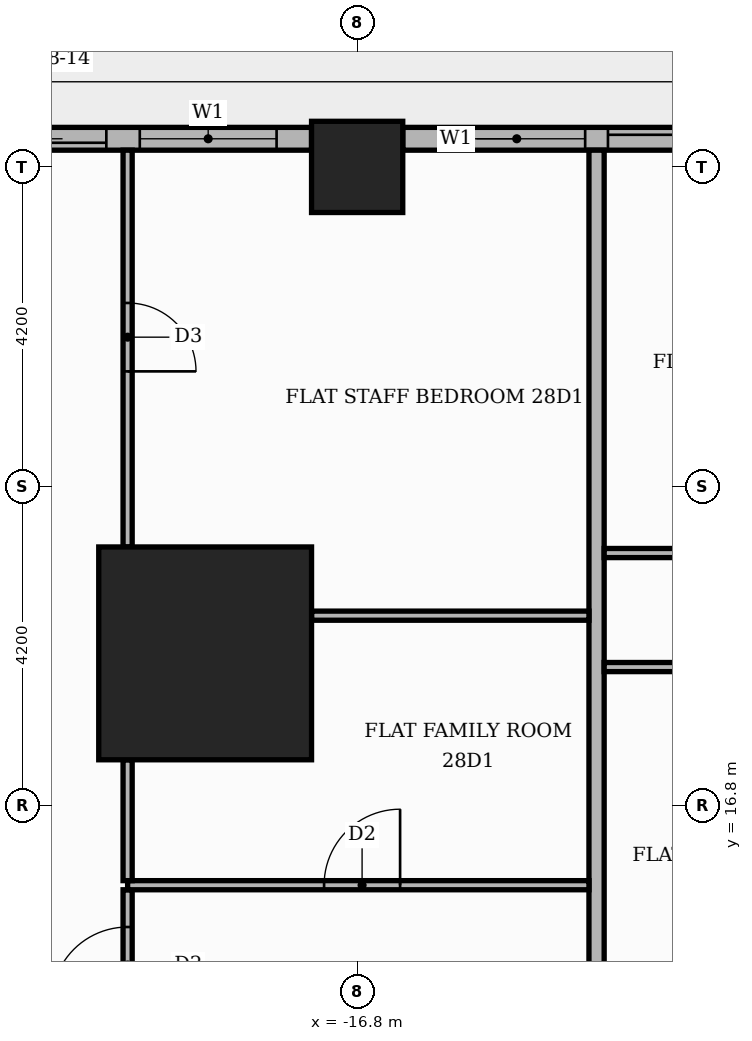
"""IFC4 building model, lengths in metres.
Left out: names, types, materials, properties, quantities, classifications, styles, units other than length and angle.
Written with IfcOpenShell. Run it as: python <this file> out.ifc"""

import sys

from ifc_helpers import new_model, si_unit, direction, frame, frame_2d, origin, origin_2d, place, context, subcontext, project, spatial, rectangle, extrude, element, fill, save


model = new_model("IFC4")
c1 = context("Model", 3, precision=1e-05, world=origin(), true_north=direction((0.0, 1.0)))
c2 = subcontext(c1, "Body", "Model", "MODEL_VIEW")
j1 = project(units=[si_unit("LENGTHUNIT", "METRE"), si_unit("PLANEANGLEUNIT", "RADIAN")], contexts=[c1])
p1 = place(None, origin())
s1 = spatial("IfcSite", under=j1, at=p1, CompositionType="ELEMENT")
p2 = place(p1, origin())
s2 = spatial("IfcBuilding", under=s1, at=p2, CompositionType="ELEMENT")
p3 = place(p2, frame((0.0, 0.0, 118.2)))
s3 = spatial("IfcBuildingStorey", under=s2, at=p3, CompositionType="ELEMENT", Elevation=118.2)
p4 = place(p3, frame((-18.8, 18.8, 0.0), z_axis=(0.0, 0.0, 1.0), x_axis=(1.0, 0.0, 0.0)))
e1 = element("IfcColumn", 1, at=p4, inside=s3, PredefinedType="COLUMN", context=c2, shape_type="SweptSolid", body=[
    extrude(rectangle(XDim=2.8, YDim=2.8, at=origin_2d()), origin(), (0.0, 0.0, 1.0), 3.9),
])
p5 = place(p3, frame((-16.8, 25.2, 0.0), z_axis=(0.0, 0.0, 1.0), x_axis=(1.0, 0.0, 0.0)))
e2 = element("IfcColumn", 2, at=p5, inside=s3, PredefinedType="COLUMN", context=c2, shape_type="SweptSolid", body=[
    extrude(rectangle(XDim=1.2, YDim=1.2, at=origin_2d()), origin(), (0.0, 0.0, 1.0), 3.9),
])
p6 = place(p3, frame((-9.0, 25.57, 0.0), z_axis=(0.0, 0.0, 1.0), x_axis=(-1.0, 0.0, 0.0)))
e3 = element("IfcWall", 3, at=p6, inside=s3, PredefinedType="STANDARD", context=c2, shape_type="SweptSolid", body=[
    extrude(rectangle(XDim=7.2, YDim=0.3, at=frame_2d((3.6, 0.0))), origin(), (0.0, 0.0, 1.0), 3.48),
])
p7 = place(p6, frame((0.6, 0.0, 0.0)))
e4 = element("IfcOpeningElement", 4, at=p7, cuts=e3, PredefinedType="OPENING", context=c2, shape_type="SweptSolid", body=[
    extrude(rectangle(XDim=3.9, YDim=2.4, at=frame_2d((1.95, 1.2))), frame((0.0, 0.16, 0.0), z_axis=(0.0, -1.0, 0.0), x_axis=(1.0, 0.0, 0.0)), (0.0, 0.0, 1.0), 0.32),
])
p8 = place(p6, frame((4.8, 0.0, 0.9)))
e5 = element("IfcOpeningElement", 5, at=p8, cuts=e3, PredefinedType="OPENING", context=c2, shape_type="SweptSolid", body=[
    extrude(rectangle(XDim=1.8, YDim=2.1, at=frame_2d((0.9, 1.05))), frame((0.0, 0.16, 0.0), z_axis=(0.0, -1.0, 0.0), x_axis=(1.0, 0.0, 0.0)), (0.0, 0.0, 1.0), 0.32),
])
p9 = place(p3, frame((-17.4, 25.57, 0.0), z_axis=(0.0, 0.0, 1.0), x_axis=(-1.0, 0.0, 0.0)))
e6 = element("IfcWall", 6, at=p9, inside=s3, PredefinedType="STANDARD", context=c2, shape_type="SweptSolid", body=[
    extrude(rectangle(XDim=4.82, YDim=0.3, at=frame_2d((2.41, 0.0))), origin(), (0.0, 0.0, 1.0), 3.48),
])
p10 = place(p9, frame((2.7, 0.0, 0.0)))
e7 = element("IfcOpeningElement", 7, at=p10, cuts=e6, PredefinedType="OPENING", context=c2, shape_type="SweptSolid", body=[
    extrude(rectangle(XDim=1.8, YDim=2.4, at=frame_2d((0.9, 1.2))), frame((0.0, 0.16, 0.0), z_axis=(0.0, -1.0, 0.0), x_axis=(1.0, 0.0, 0.0)), (0.0, 0.0, 1.0), 0.32),
])
p11 = place(p9, frame((0.46, 0.0, 0.9)))
e8 = element("IfcOpeningElement", 8, at=p11, cuts=e6, PredefinedType="OPENING", context=c2, shape_type="SweptSolid", body=[
    extrude(rectangle(XDim=1.8, YDim=2.1, at=frame_2d((0.9, 1.05))), frame((0.0, 0.16, 0.0), z_axis=(0.0, -1.0, 0.0), x_axis=(1.0, 0.0, 0.0)), (0.0, 0.0, 1.0), 0.32),
])
p12 = place(p3, frame((-19.82, 13.71, 0.0), z_axis=(0.0, 0.0, 1.0), x_axis=(0.0, 1.0, 0.0)))
e9 = element("IfcWall", 9, at=p12, inside=s3, PredefinedType="PARTITIONING", context=c2, shape_type="SweptSolid", body=[
    extrude(rectangle(XDim=1.98, YDim=0.12, at=frame_2d((0.99, 0.0))), origin(), (0.0, 0.0, 1.0), 3.48),
])
p13 = place(p12, frame((0.49, 0.0, 0.0)))
e10 = element("IfcOpeningElement", 10, at=p13, cuts=e9, PredefinedType="OPENING", context=c2, shape_type="SweptSolid", body=[
    extrude(rectangle(XDim=1.0, YDim=2.1, at=frame_2d((0.5, 1.05))), frame((0.0, 0.07, 0.0), z_axis=(0.0, -1.0, 0.0), x_axis=(1.0, 0.0, 0.0)), (0.0, 0.0, 1.0), 0.14),
])
p14 = place(p3, frame((-13.65, 13.75, 0.0), z_axis=(0.0, 0.0, 1.0), x_axis=(0.0, 1.0, 0.0)))
e11 = element("IfcWall", 11, at=p14, inside=s3, PredefinedType="PARTITIONING", context=c2, shape_type="SweptSolid", body=[
    extrude(rectangle(XDim=11.67, YDim=0.2, at=frame_2d((5.835, 0.0))), origin(), (0.0, 0.0, 1.0), 3.48),
])
p15 = place(p3, frame((-19.82, 15.75, 0.0), z_axis=(0.0, 0.0, 1.0), x_axis=(1.0, 0.0, 0.0)))
e12 = element("IfcWall", 12, at=p15, inside=s3, PredefinedType="PARTITIONING", context=c2, shape_type="SweptSolid", body=[
    extrude(rectangle(XDim=6.07, YDim=0.12, at=frame_2d((3.035, 0.0))), origin(), (0.0, 0.0, 1.0), 3.48),
])
p16 = place(p15, frame((2.585, 0.0, 0.0)))
e13 = element("IfcOpeningElement", 13, at=p16, cuts=e12, PredefinedType="OPENING", context=c2, shape_type="SweptSolid", body=[
    extrude(rectangle(XDim=1.0, YDim=2.1, at=frame_2d((0.5, 1.05))), frame((0.0, 0.07, 0.0), z_axis=(0.0, -1.0, 0.0), x_axis=(1.0, 0.0, 0.0)), (0.0, 0.0, 1.0), 0.14),
])
p17 = place(p3, frame((-19.82, 15.81, 0.0), z_axis=(0.0, 0.0, 1.0), x_axis=(0.0, 1.0, 0.0)))
e14 = element("IfcWall", 14, at=p17, inside=s3, PredefinedType="PARTITIONING", context=c2, shape_type="SweptSolid", body=[
    extrude(rectangle(XDim=1.59, YDim=0.12, at=frame_2d((0.795, 0.0))), origin(), (0.0, 0.0, 1.0), 3.48),
])
p18 = place(p3, frame((-13.55, 18.62, 0.0), z_axis=(0.0, 0.0, 1.0), x_axis=(1.0, 0.0, 0.0)))
e15 = element("IfcWall", 15, at=p18, inside=s3, PredefinedType="PARTITIONING", context=c2, shape_type="SweptSolid", body=[
    extrude(rectangle(XDim=12.5, YDim=0.12, at=frame_2d((6.25, 0.0))), origin(), (0.0, 0.0, 1.0), 3.48),
])
p19 = place(p18, frame((8.9, 0.0, 0.0)))
e16 = element("IfcOpeningElement", 16, at=p19, cuts=e15, PredefinedType="OPENING", context=c2, shape_type="SweptSolid", body=[
    extrude(rectangle(XDim=0.9, YDim=2.1, at=frame_2d((0.45, 1.05))), frame((0.0, 0.07, 0.0), z_axis=(0.0, -1.0, 0.0), x_axis=(1.0, 0.0, 0.0)), (0.0, 0.0, 1.0), 0.14),
])
p20 = place(p18, frame((4.85, 0.0, 0.0)))
e17 = element("IfcOpeningElement", 17, at=p20, cuts=e15, PredefinedType="OPENING", context=c2, shape_type="SweptSolid", body=[
    extrude(rectangle(XDim=0.9, YDim=2.1, at=frame_2d((0.45, 1.05))), frame((0.0, 0.07, 0.0), z_axis=(0.0, -1.0, 0.0), x_axis=(1.0, 0.0, 0.0)), (0.0, 0.0, 1.0), 0.14),
])
p21 = place(p18, frame((1.7, 0.0, 0.0)))
e18 = element("IfcOpeningElement", 18, at=p21, cuts=e15, PredefinedType="OPENING", context=c2, shape_type="SweptSolid", body=[
    extrude(rectangle(XDim=0.9, YDim=2.1, at=frame_2d((0.45, 1.05))), frame((0.0, 0.07, 0.0), z_axis=(0.0, -1.0, 0.0), x_axis=(1.0, 0.0, 0.0)), (0.0, 0.0, 1.0), 0.14),
])
p22 = place(p3, frame((-17.4, 19.296, 0.0), z_axis=(0.0, 0.0, 1.0), x_axis=(1.0, 0.0, 0.0)))
e19 = element("IfcWall", 19, at=p22, inside=s3, PredefinedType="PARTITIONING", context=c2, shape_type="SweptSolid", body=[
    extrude(rectangle(XDim=3.65, YDim=0.12, at=frame_2d((1.825, 0.0))), origin(), (0.0, 0.0, 1.0), 3.48),
])
p23 = place(p3, frame((-13.55, 20.12, 0.0), z_axis=(0.0, 0.0, 1.0), x_axis=(1.0, 0.0, 0.0)))
e20 = element("IfcWall", 20, at=p23, inside=s3, PredefinedType="PARTITIONING", context=c2, shape_type="SweptSolid", body=[
    extrude(rectangle(XDim=18.7, YDim=0.12, at=frame_2d((9.35, 0.0))), origin(), (0.0, 0.0, 1.0), 3.48),
])
p24 = place(p23, frame((14.15, 0.0, 0.0)))
e21 = element("IfcOpeningElement", 21, at=p24, cuts=e20, PredefinedType="OPENING", context=c2, shape_type="SweptSolid", body=[
    extrude(rectangle(XDim=0.9, YDim=2.1, at=frame_2d((0.45, 1.05))), frame((0.0, 0.07, 0.0), z_axis=(0.0, -1.0, 0.0), x_axis=(1.0, 0.0, 0.0)), (0.0, 0.0, 1.0), 0.14),
])
p25 = place(p23, frame((2.55, 0.0, 0.0)))
e22 = element("IfcOpeningElement", 22, at=p25, cuts=e20, PredefinedType="OPENING", context=c2, shape_type="SweptSolid", body=[
    extrude(rectangle(XDim=1.0, YDim=2.1, at=frame_2d((0.5, 1.05))), frame((0.0, 0.07, 0.0), z_axis=(0.0, -1.0, 0.0), x_axis=(1.0, 0.0, 0.0)), (0.0, 0.0, 1.0), 0.14),
])
p26 = place(p3, frame((-19.82, 20.2, 0.0), z_axis=(0.0, 0.0, 1.0), x_axis=(0.0, 1.0, 0.0)))
e23 = element("IfcWall", 23, at=p26, inside=s3, PredefinedType="PARTITIONING", context=c2, shape_type="SweptSolid", body=[
    extrude(rectangle(XDim=5.22, YDim=0.12, at=frame_2d((2.61, 0.0))), origin(), (0.0, 0.0, 1.0), 3.48),
])
p27 = place(p26, frame((2.31, 0.0, 0.0)))
e24 = element("IfcOpeningElement", 24, at=p27, cuts=e23, PredefinedType="OPENING", context=c2, shape_type="SweptSolid", body=[
    extrude(rectangle(XDim=0.9, YDim=2.1, at=frame_2d((0.45, 1.05))), frame((0.0, 0.07, 0.0), z_axis=(0.0, -1.0, 0.0), x_axis=(1.0, 0.0, 0.0)), (0.0, 0.0, 1.0), 0.14),
])
p28 = place(p7, origin())
e25 = element("IfcDoor", 25, at=p28, inside=s3, OperationType="SLIDING_TO_LEFT", PredefinedType="DOOR", context=c2, shape_type="SweptSolid", body=[
    extrude(rectangle(XDim=3.9, YDim=2.4, at=frame_2d((1.95, 1.2))), frame((0.0, 0.025, 0.0), z_axis=(0.0, -1.0, 0.0), x_axis=(1.0, 0.0, 0.0)), (0.0, 0.0, 1.0), 0.05),
])
fill(e4, e25)
p29 = place(p8, origin())
e26 = element("IfcWindow", 26, at=p29, inside=s3, PartitioningType="SINGLE_PANEL", PredefinedType="WINDOW", context=c2, shape_type="SweptSolid", body=[
    extrude(rectangle(XDim=1.8, YDim=2.1, at=frame_2d((0.9, 1.05))), frame((0.0, 0.03, 0.0), z_axis=(0.0, -1.0, 0.0), x_axis=(1.0, 0.0, 0.0)), (0.0, 0.0, 1.0), 0.06),
])
fill(e5, e26)
p30 = place(p10, origin())
e27 = element("IfcDoor", 27, at=p30, inside=s3, OperationType="SLIDING_TO_LEFT", PredefinedType="DOOR", context=c2, shape_type="SweptSolid", body=[
    extrude(rectangle(XDim=1.8, YDim=2.4, at=frame_2d((0.9, 1.2))), frame((0.0, 0.025, 0.0), z_axis=(0.0, -1.0, 0.0), x_axis=(1.0, 0.0, 0.0)), (0.0, 0.0, 1.0), 0.05),
])
fill(e7, e27)
p31 = place(p11, origin())
e28 = element("IfcWindow", 28, at=p31, inside=s3, PartitioningType="SINGLE_PANEL", PredefinedType="WINDOW", context=c2, shape_type="SweptSolid", body=[
    extrude(rectangle(XDim=1.8, YDim=2.1, at=frame_2d((0.9, 1.05))), frame((0.0, 0.03, 0.0), z_axis=(0.0, -1.0, 0.0), x_axis=(1.0, 0.0, 0.0)), (0.0, 0.0, 1.0), 0.06),
])
fill(e8, e28)
p32 = place(p27, frame((0.9, 0.0, 0.0), z_axis=(0.0, 0.0, 1.0), x_axis=(-1.0, 0.0, 0.0)))
e29 = element("IfcDoor", 29, at=p32, inside=s3, OperationType="SINGLE_SWING_LEFT", PredefinedType="DOOR", context=c2, shape_type="SweptSolid", body=[
    extrude(rectangle(XDim=0.9, YDim=2.1, at=frame_2d((0.45, 1.05))), frame((0.0, 0.025, 0.0), z_axis=(0.0, -1.0, 0.0), x_axis=(1.0, 0.0, 0.0)), (0.0, 0.0, 1.0), 0.05),
])
fill(e24, e29)
p33 = place(p16, origin())
e30 = element("IfcDoor", 30, at=p33, inside=s3, OperationType="SINGLE_SWING_RIGHT", PredefinedType="DOOR", context=c2, shape_type="SweptSolid", body=[
    extrude(rectangle(XDim=1.0, YDim=2.1, at=frame_2d((0.5, 1.05))), frame((0.0, 0.025, 0.0), z_axis=(0.0, -1.0, 0.0), x_axis=(1.0, 0.0, 0.0)), (0.0, 0.0, 1.0), 0.05),
])
fill(e13, e30)
p34 = place(p13, origin())
e31 = element("IfcDoor", 31, at=p34, inside=s3, OperationType="SINGLE_SWING_LEFT", PredefinedType="DOOR", context=c2, shape_type="SweptSolid", body=[
    extrude(rectangle(XDim=1.0, YDim=2.1, at=frame_2d((0.5, 1.05))), frame((0.0, 0.025, 0.0), z_axis=(0.0, -1.0, 0.0), x_axis=(1.0, 0.0, 0.0)), (0.0, 0.0, 1.0), 0.05),
])
fill(e10, e31)
save(model, sys.argv[1])
